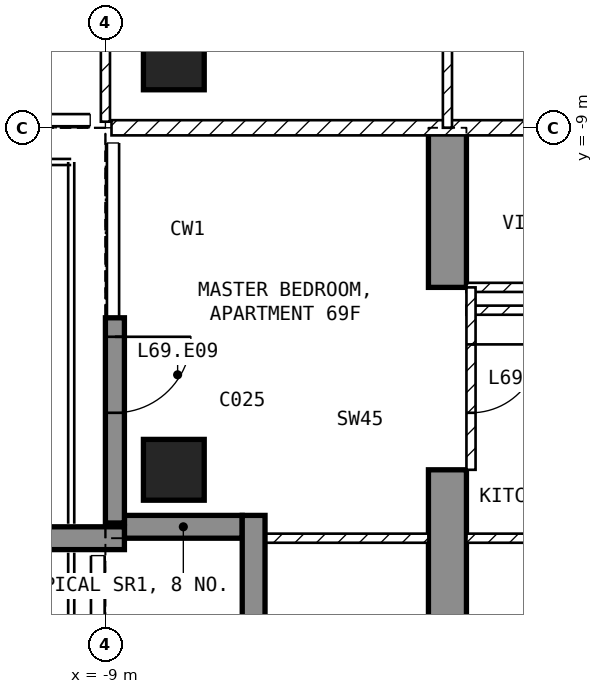
"""IFC4 building model, lengths in metres.
Left out: names, types, materials, properties, quantities, classifications, styles, units other than length and angle.
Written with IfcOpenShell. Run it as: python <this file> out.ifc"""

import sys

from ifc_helpers import new_model, si_unit, direction, frame, frame_2d, origin, origin_2d, place, context, subcontext, project, spatial, polyline, rectangle, outline, extrude, element, fill, save


model = new_model("IFC4")
c1 = context("Model", 3, precision=1e-05, world=origin(), true_north=direction((0.0, 1.0)))
c2 = subcontext(c1, "Body", "Model", "MODEL_VIEW")
j1 = project(units=[si_unit("LENGTHUNIT", "METRE"), si_unit("PLANEANGLEUNIT", "RADIAN")], contexts=[c1])
p1 = place(None, origin())
s1 = spatial("IfcSite", under=j1, at=p1, CompositionType="ELEMENT")
p2 = place(p1, origin())
s2 = spatial("IfcBuilding", under=s1, at=p2, CompositionType="ELEMENT")
p3 = place(p2, frame((0.0, 0.0, 271.0)))
s3 = spatial("IfcBuildingStorey", under=s2, at=p3, CompositionType="ELEMENT", Elevation=271.0)
for number, where, z_axis, x_axis in (
    (1, (-8.1, -13.5, -0.25), (0.0, 0.0, 1.0), (1.0, 0.0, 0.0)),
    (2, (-8.1, -8.1, -0.25), (0.0, 0.0, 1.0), (1.0, 0.0, 0.0)),
):
    element("IfcColumn", number, at=place(p3, frame(where, z_axis=z_axis, x_axis=x_axis)), inside=s3, PredefinedType="COLUMN", context=c2, shape_type="SweptSolid", body=[
        extrude(rectangle(XDim=0.8, YDim=0.8, at=origin_2d()), origin(), (0.0, 0.0, 1.0), 3.5),
    ])
p4 = place(p3, frame((-4.75, -16.7, -0.25), z_axis=(1.0, 0.0, 0.0), x_axis=(0.0, 1.0, 0.0)))
e3 = element("IfcWall", 3, at=p4, inside=s3, PredefinedType="SHEAR", context=c2, shape_type="SweptSolid", body=[
    extrude(outline(polyline([(0.0, 0.0), (3.2, 0.0), (3.2, 2.65), (5.6, 2.65), (5.6, 0.0), (7.7, 0.0), (7.7, 3.5), (0.0, 3.5), (0.0, 0.0)])), origin(), (0.0, 0.0, 1.0), 0.5),
])
p5 = place(p3, frame((-8.875, -11.5, 0.0), z_axis=(0.0, 0.0, 1.0), x_axis=(0.0, -1.0, 0.0)))
e4 = element("IfcWall", 4, at=p5, inside=s3, PredefinedType="SOLIDWALL", context=c2, shape_type="SweptSolid", body=[
    extrude(rectangle(XDim=2.7, YDim=0.25, at=frame_2d((1.35, 0.0))), origin(), (0.0, 0.0, 1.0), 3.25),
])
p6 = place(p5, frame((0.25, 0.0, 0.0)))
e5 = element("IfcOpeningElement", 5, at=p6, cuts=e4, PredefinedType="OPENING", context=c2, shape_type="SweptSolid", body=[
    extrude(rectangle(XDim=1.0, YDim=2.4, at=frame_2d((0.5, 1.2))), frame((0.0, 0.135, 0.0), z_axis=(0.0, -1.0, 0.0), x_axis=(1.0, 0.0, 0.0)), (0.0, 0.0, 1.0), 0.27),
])
p7 = place(p3, frame((-8.75, -14.25, 0.0), z_axis=(0.0, 0.0, 1.0), x_axis=(1.0, 0.0, 0.0)))
e6 = element("IfcWall", 6, at=p7, inside=s3, PredefinedType="SOLIDWALL", context=c2, shape_type="SweptSolid", body=[
    extrude(rectangle(XDim=1.55, YDim=0.3, at=frame_2d((0.775, 0.0))), origin(), (0.0, 0.0, 1.0), 3.25),
])
p8 = place(p3, frame((-7.05, -14.1, 0.0), z_axis=(0.0, 0.0, 1.0), x_axis=(0.0, -1.0, 0.0)))
e7 = element("IfcWall", 7, at=p8, inside=s3, PredefinedType="SOLIDWALL", context=c2, shape_type="SweptSolid", body=[
    extrude(rectangle(XDim=1.8, YDim=0.3, at=frame_2d((0.9, 0.0))), origin(), (0.0, 0.0, 1.0), 3.25),
])
p9 = place(p3, frame((-8.75, -14.4, 0.0), z_axis=(0.0, 0.0, 1.0), x_axis=(-1.0, 0.0, 0.0)))
e8 = element("IfcWall", 8, at=p9, inside=s3, PredefinedType="SOLIDWALL", context=c2, shape_type="SweptSolid", body=[
    extrude(rectangle(XDim=2.95, YDim=0.3, at=frame_2d((1.475, 0.0))), origin(), (0.0, 0.0, 1.0), 3.25),
])
p10 = place(p3, frame((8.92, -9.0, 0.0), z_axis=(0.0, 0.0, 1.0), x_axis=(-1.0, 0.0, 0.0)))
e9 = element("IfcWall", 9, at=p10, inside=s3, PredefinedType="PARTITIONING", context=c2, shape_type="SweptSolid", body=[
    extrude(rectangle(XDim=17.84, YDim=0.2, at=frame_2d((8.92, 0.0))), origin(), (0.0, 0.0, 1.0), 3.25),
])
p11 = place(p10, frame((8.42, 0.0, 0.0)))
e10 = element("IfcOpeningElement", 10, at=p11, cuts=e9, PredefinedType="OPENING", context=c2, shape_type="SweptSolid", body=[
    extrude(rectangle(XDim=1.0, YDim=2.1, at=frame_2d((0.5, 1.05))), frame((0.0, 0.11, 0.0), z_axis=(0.0, -1.0, 0.0), x_axis=(1.0, 0.0, 0.0)), (0.0, 0.0, 1.0), 0.22),
])
p12 = place(p3, frame((-9.0, -3.0, 0.0), z_axis=(0.0, 0.0, 1.0), x_axis=(0.0, -1.0, 0.0)))
e11 = element("IfcWall", 11, at=p12, inside=s3, PredefinedType="PARTITIONING", context=c2, shape_type="SweptSolid", body=[
    extrude(rectangle(XDim=5.92, YDim=0.12, at=frame_2d((2.96, 0.0))), origin(), (0.0, 0.0, 1.0), 3.25),
])
p13 = place(p12, frame((2.4, 0.0, 0.0)))
e12 = element("IfcOpeningElement", 12, at=p13, cuts=e11, PredefinedType="OPENING", context=c2, shape_type="SweptSolid", body=[
    extrude(rectangle(XDim=0.9, YDim=2.1, at=frame_2d((0.45, 1.05))), frame((0.0, 0.07, 0.0), z_axis=(0.0, -1.0, 0.0), x_axis=(1.0, 0.0, 0.0)), (0.0, 0.0, 1.0), 0.14),
])
p14 = place(p3, frame((-4.5, -4.5, 0.0), z_axis=(0.0, 0.0, 1.0), x_axis=(0.0, -1.0, 0.0)))
e13 = element("IfcWall", 13, at=p14, inside=s3, PredefinedType="PARTITIONING", context=c2, shape_type="SweptSolid", body=[
    extrude(rectangle(XDim=4.5, YDim=0.12, at=frame_2d((2.25, 0.0))), origin(), (0.0, 0.0, 1.0), 3.25),
])
p15 = place(p14, frame((1.8, 0.0, 0.0)))
e14 = element("IfcOpeningElement", 14, at=p15, cuts=e13, PredefinedType="OPENING", context=c2, shape_type="SweptSolid", body=[
    extrude(rectangle(XDim=0.9, YDim=2.1, at=frame_2d((0.45, 1.05))), frame((0.0, 0.07, 0.0), z_axis=(0.0, -1.0, 0.0), x_axis=(1.0, 0.0, 0.0)), (0.0, 0.0, 1.0), 0.14),
])
p16 = place(p3, frame((2.1, -11.1, 0.0), z_axis=(0.0, 0.0, 1.0), x_axis=(-1.0, 0.0, 0.0)))
e15 = element("IfcWall", 15, at=p16, inside=s3, PredefinedType="PARTITIONING", context=c2, shape_type="SweptSolid", body=[
    extrude(rectangle(XDim=6.35, YDim=0.12, at=frame_2d((3.175, 0.0))), origin(), (0.0, 0.0, 1.0), 3.25),
])
p17 = place(p16, frame((1.625, 0.0, 0.0)))
e16 = element("IfcOpeningElement", 16, at=p17, cuts=e15, PredefinedType="OPENING", context=c2, shape_type="SweptSolid", body=[
    extrude(rectangle(XDim=0.9, YDim=2.1, at=frame_2d((0.45, 1.05))), frame((0.0, 0.07, 0.0), z_axis=(0.0, -1.0, 0.0), x_axis=(1.0, 0.0, 0.0)), (0.0, 0.0, 1.0), 0.14),
])
p18 = place(p3, frame((-0.44, -11.4, 0.0), z_axis=(0.0, 0.0, 1.0), x_axis=(-1.0, 0.0, 0.0)))
e17 = element("IfcWall", 17, at=p18, inside=s3, PredefinedType="PARTITIONING", context=c2, shape_type="SweptSolid", body=[
    extrude(rectangle(XDim=3.81, YDim=0.12, at=frame_2d((1.905, 0.0))), origin(), (0.0, 0.0, 1.0), 3.25),
])
p19 = place(p3, frame((4.25, -14.4, 0.0), z_axis=(0.0, 0.0, 1.0), x_axis=(-1.0, 0.0, 0.0)))
e18 = element("IfcWall", 18, at=p19, inside=s3, PredefinedType="PARTITIONING", context=c2, shape_type="SweptSolid", body=[
    extrude(rectangle(XDim=8.5, YDim=0.12, at=frame_2d((4.25, 0.0))), origin(), (0.0, 0.0, 1.0), 3.25),
])
p20 = place(p19, frame((1.925, 0.0, 0.0)))
e19 = element("IfcOpeningElement", 19, at=p20, cuts=e18, PredefinedType="OPENING", context=c2, shape_type="SweptSolid", body=[
    extrude(rectangle(XDim=0.9, YDim=2.1, at=frame_2d((0.45, 1.05))), frame((0.0, 0.07, 0.0), z_axis=(0.0, -1.0, 0.0), x_axis=(1.0, 0.0, 0.0)), (0.0, 0.0, 1.0), 0.14),
])
p21 = place(p3, frame((-4.75, -14.4, 0.0), z_axis=(0.0, 0.0, 1.0), x_axis=(-1.0, 0.0, 0.0)))
e20 = element("IfcWall", 20, at=p21, inside=s3, PredefinedType="PARTITIONING", context=c2, shape_type="SweptSolid", body=[
    extrude(rectangle(XDim=2.37, YDim=0.12, at=frame_2d((1.185, 0.0))), origin(), (0.0, 0.0, 1.0), 3.25),
])
p22 = place(p3, frame((-4.19, -11.1, 0.0), z_axis=(0.0, 0.0, 1.0), x_axis=(0.0, -1.0, 0.0)))
e21 = element("IfcWall", 21, at=p22, inside=s3, PredefinedType="PARTITIONING", context=c2, shape_type="SweptSolid", body=[
    extrude(rectangle(XDim=2.4, YDim=0.12, at=frame_2d((1.2, 0.0))), origin(), (0.0, 0.0, 1.0), 2.4),
])
p23 = place(p22, frame((0.75, 0.0, 0.0)))
e22 = element("IfcOpeningElement", 22, at=p23, cuts=e21, PredefinedType="OPENING", context=c2, shape_type="SweptSolid", body=[
    extrude(rectangle(XDim=0.9, YDim=2.1, at=frame_2d((0.45, 1.05))), frame((0.0, 0.07, 0.0), z_axis=(0.0, -1.0, 0.0), x_axis=(1.0, 0.0, 0.0)), (0.0, 0.0, 1.0), 0.14),
])
p24 = place(p6, origin())
e23 = element("IfcDoor", 23, at=p24, inside=s3, OperationType="SINGLE_SWING_LEFT", PredefinedType="DOOR", context=c2, shape_type="SweptSolid", body=[
    extrude(rectangle(XDim=1.0, YDim=2.4, at=frame_2d((0.5, 1.2))), frame((0.0, 0.025, 0.0), z_axis=(0.0, -1.0, 0.0), x_axis=(1.0, 0.0, 0.0)), (0.0, 0.0, 1.0), 0.05),
])
fill(e5, e23)
p25 = place(p23, origin())
e24 = element("IfcDoor", 24, at=p25, inside=s3, OperationType="SINGLE_SWING_LEFT", PredefinedType="DOOR", context=c2, shape_type="SweptSolid", body=[
    extrude(rectangle(XDim=0.9, YDim=2.1, at=frame_2d((0.45, 1.05))), frame((0.0, 0.025, 0.0), z_axis=(0.0, -1.0, 0.0), x_axis=(1.0, 0.0, 0.0)), (0.0, 0.0, 1.0), 0.05),
])
fill(e22, e24)
save(model, sys.argv[1])
